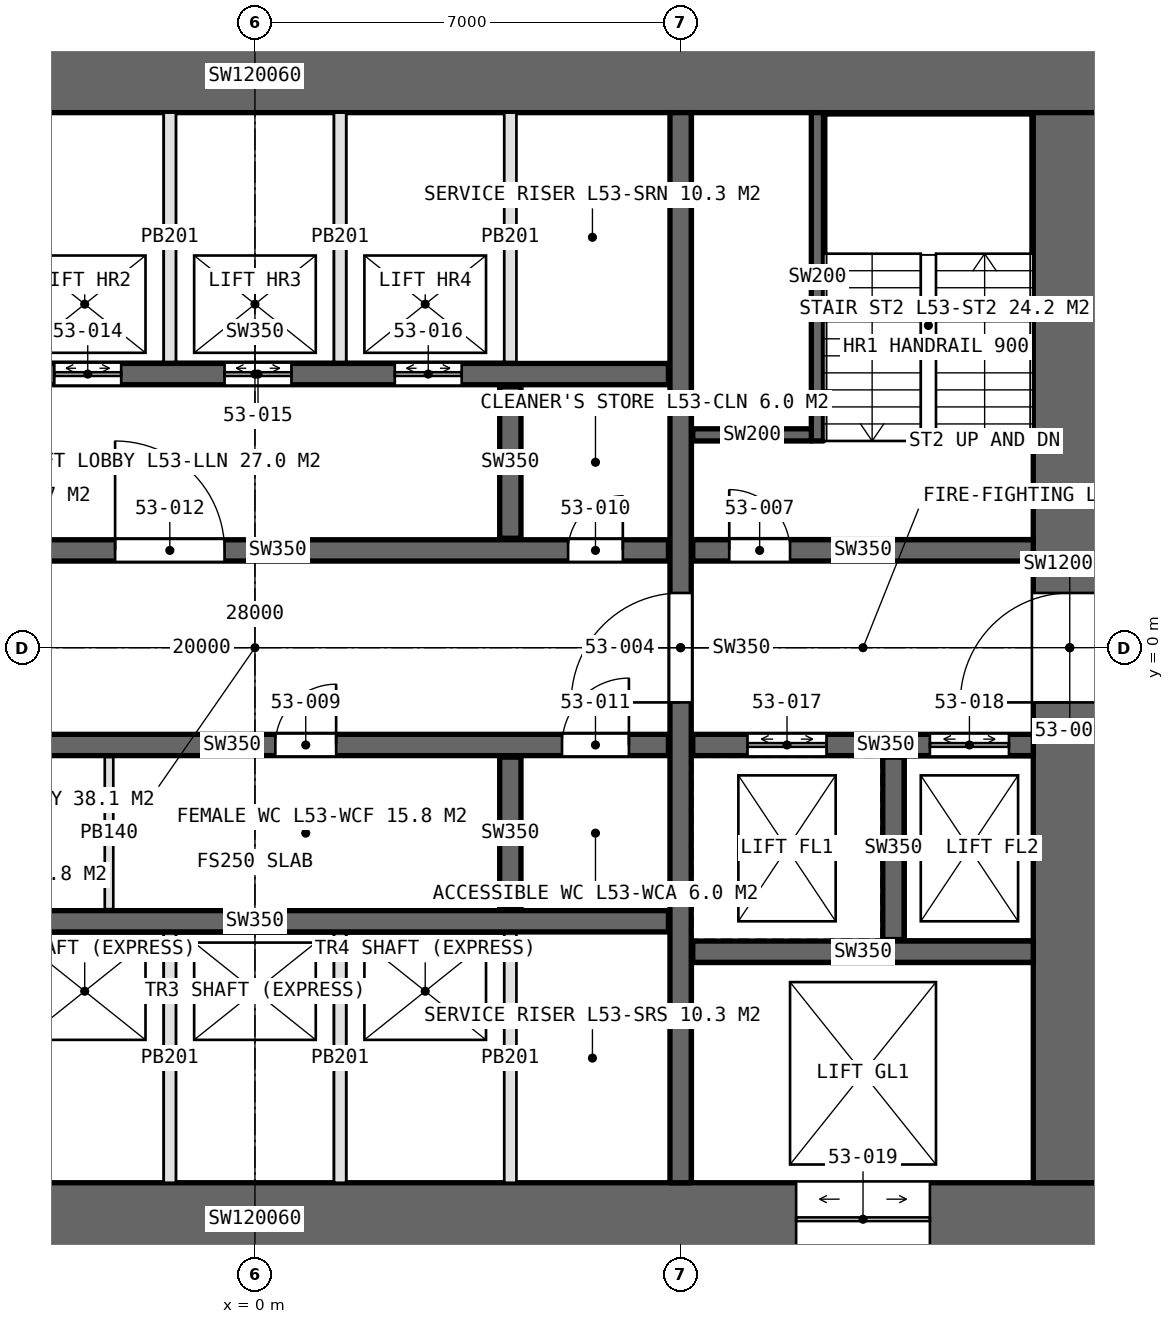
"""IFC4 building model, lengths in metres.
Left out: names, types, materials, properties, quantities, classifications, styles, units other than length and angle.
Written with IfcOpenShell. Run it as: python <this file> out.ifc"""

import sys

from ifc_helpers import new_model, si_unit, direction, frame, frame_2d, origin, place, context, subcontext, project, spatial, rectangle, extrude, element, fill, save


model = new_model("IFC4")
c1 = context("Model", 3, precision=1e-05, world=origin(), true_north=direction((0.0, 1.0)))
c2 = subcontext(c1, "Body", "Model", "MODEL_VIEW")
j1 = project(units=[si_unit("LENGTHUNIT", "METRE"), si_unit("PLANEANGLEUNIT", "RADIAN")], contexts=[c1])
p1 = place(None, origin())
s1 = spatial("IfcSite", under=j1, at=p1, CompositionType="ELEMENT")
p2 = place(p1, origin())
s2 = spatial("IfcBuilding", under=s1, at=p2, CompositionType="ELEMENT")
p3 = place(p2, frame((0.0, 0.0, 241.0)))
s3 = spatial("IfcBuildingStorey", under=s2, at=p3, CompositionType="ELEMENT", Elevation=241.0)
p4 = place(p3, frame((-14.0, -9.4, 0.0), z_axis=(0.0, 0.0, 1.0), x_axis=(1.0, 0.0, 0.0)))
e1 = element("IfcWall", 1, at=p4, inside=s3, PredefinedType="SHEAR", context=c2, shape_type="SweptSolid", body=[
    extrude(rectangle(XDim=28.0, YDim=1.2, at=frame_2d((14.0, 0.0))), origin(), (0.0, 0.0, 1.0), 4.2),
])
p5 = place(p4, frame((22.9, 0.0, 0.0)))
e2 = element("IfcOpeningElement", 2, at=p5, cuts=e1, PredefinedType="OPENING", context=c2, shape_type="SweptSolid", body=[
    extrude(rectangle(XDim=2.2, YDim=2.7, at=frame_2d((1.1, 1.35))), frame((0.0, 0.61, 0.0), z_axis=(0.0, -1.0, 0.0), x_axis=(1.0, 0.0, 0.0)), (0.0, 0.0, 1.0), 1.22),
])
p6 = place(p3, frame((14.0, 9.4, 0.0), z_axis=(0.0, 0.0, 1.0), x_axis=(-1.0, 0.0, 0.0)))
e3 = element("IfcWall", 3, at=p6, inside=s3, PredefinedType="SHEAR", context=c2, shape_type="SweptSolid", body=[
    extrude(rectangle(XDim=28.0, YDim=1.2, at=frame_2d((14.0, 0.0))), origin(), (0.0, 0.0, 1.0), 4.2),
])
p7 = place(p6, frame((24.0, 0.0, 0.0)))
e4 = element("IfcOpeningElement", 4, at=p7, cuts=e3, PredefinedType="OPENING", context=c2, shape_type="SweptSolid", body=[
    extrude(rectangle(XDim=1.0, YDim=2.4, at=frame_2d((0.5, 1.2))), frame((0.0, 0.61, 0.0), z_axis=(0.0, -1.0, 0.0), x_axis=(1.0, 0.0, 0.0)), (0.0, 0.0, 1.0), 1.22),
])
p8 = place(p3, frame((13.4, -8.8, 0.0), z_axis=(0.0, 0.0, 1.0), x_axis=(0.0, 1.0, 0.0)))
e5 = element("IfcWall", 5, at=p8, inside=s3, PredefinedType="SHEAR", context=c2, shape_type="SweptSolid", body=[
    extrude(rectangle(XDim=17.6, YDim=1.2, at=frame_2d((8.8, 0.0))), origin(), (0.0, 0.0, 1.0), 4.2),
])
p9 = place(p8, frame((7.9, 0.0, 0.0)))
e6 = element("IfcOpeningElement", 6, at=p9, cuts=e5, PredefinedType="OPENING", context=c2, shape_type="SweptSolid", body=[
    extrude(rectangle(XDim=1.8, YDim=2.4, at=frame_2d((0.9, 1.2))), frame((0.0, 0.61, 0.0), z_axis=(0.0, -1.0, 0.0), x_axis=(1.0, 0.0, 0.0)), (0.0, 0.0, 1.0), 1.22),
])
p10 = place(p3, frame((7.0, -8.8, 0.0), z_axis=(0.0, 0.0, 1.0), x_axis=(0.0, 1.0, 0.0)))
e7 = element("IfcWall", 7, at=p10, inside=s3, PredefinedType="SHEAR", context=c2, shape_type="SweptSolid", body=[
    extrude(rectangle(XDim=17.6, YDim=0.35, at=frame_2d((8.8, 0.0))), origin(), (0.0, 0.0, 1.0), 4.2),
])
p11 = place(p10, frame((7.9, 0.0, 0.0)))
e8 = element("IfcOpeningElement", 8, at=p11, cuts=e7, PredefinedType="OPENING", context=c2, shape_type="SweptSolid", body=[
    extrude(rectangle(XDim=1.8, YDim=2.4, at=frame_2d((0.9, 1.2))), frame((0.0, 0.185, 0.0), z_axis=(0.0, -1.0, 0.0), x_axis=(1.0, 0.0, 0.0)), (0.0, 0.0, 1.0), 0.37),
])
p12 = place(p3, frame((-6.8, 1.6, 0.0), z_axis=(0.0, 0.0, 1.0), x_axis=(1.0, 0.0, 0.0)))
e9 = element("IfcWall", 9, at=p12, inside=s3, PredefinedType="SHEAR", context=c2, shape_type="SweptSolid", body=[
    extrude(rectangle(XDim=13.6, YDim=0.35, at=frame_2d((6.8, 0.0))), origin(), (0.0, 0.0, 1.0), 4.2),
])
p13 = place(p12, frame((11.95, 0.0, 0.0)))
e10 = element("IfcOpeningElement", 10, at=p13, cuts=e9, PredefinedType="OPENING", context=c2, shape_type="SweptSolid", body=[
    extrude(rectangle(XDim=0.9, YDim=2.4, at=frame_2d((0.45, 1.2))), frame((0.0, 0.185, 0.0), z_axis=(0.0, -1.0, 0.0), x_axis=(1.0, 0.0, 0.0)), (0.0, 0.0, 1.0), 0.37),
])
p14 = place(p12, frame((4.5, 0.0, 0.0)))
e11 = element("IfcOpeningElement", 11, at=p14, cuts=e9, PredefinedType="OPENING", context=c2, shape_type="SweptSolid", body=[
    extrude(rectangle(XDim=1.8, YDim=2.4, at=frame_2d((0.9, 1.2))), frame((0.0, 0.185, 0.0), z_axis=(0.0, -1.0, 0.0), x_axis=(1.0, 0.0, 0.0)), (0.0, 0.0, 1.0), 0.37),
])
p15 = place(p3, frame((-6.8, -1.6, 0.0), z_axis=(0.0, 0.0, 1.0), x_axis=(1.0, 0.0, 0.0)))
e12 = element("IfcWall", 12, at=p15, inside=s3, PredefinedType="SHEAR", context=c2, shape_type="SweptSolid", body=[
    extrude(rectangle(XDim=13.6, YDim=0.35, at=frame_2d((6.8, 0.0))), origin(), (0.0, 0.0, 1.0), 4.2),
])
p16 = place(p15, frame((1.665, 0.0, 0.0)))
e13 = element("IfcOpeningElement", 13, at=p16, cuts=e12, PredefinedType="OPENING", context=c2, shape_type="SweptSolid", body=[
    extrude(rectangle(XDim=1.0, YDim=2.4, at=frame_2d((0.5, 1.2))), frame((0.0, 0.185, 0.0), z_axis=(0.0, -1.0, 0.0), x_axis=(1.0, 0.0, 0.0)), (0.0, 0.0, 1.0), 0.37),
])
p17 = place(p15, frame((7.135, 0.0, 0.0)))
e14 = element("IfcOpeningElement", 14, at=p17, cuts=e12, PredefinedType="OPENING", context=c2, shape_type="SweptSolid", body=[
    extrude(rectangle(XDim=1.0, YDim=2.4, at=frame_2d((0.5, 1.2))), frame((0.0, 0.185, 0.0), z_axis=(0.0, -1.0, 0.0), x_axis=(1.0, 0.0, 0.0)), (0.0, 0.0, 1.0), 0.37),
])
p18 = place(p15, frame((11.85, 0.0, 0.0)))
e15 = element("IfcOpeningElement", 15, at=p18, cuts=e12, PredefinedType="OPENING", context=c2, shape_type="SweptSolid", body=[
    extrude(rectangle(XDim=1.1, YDim=2.4, at=frame_2d((0.55, 1.2))), frame((0.0, 0.185, 0.0), z_axis=(0.0, -1.0, 0.0), x_axis=(1.0, 0.0, 0.0)), (0.0, 0.0, 1.0), 0.37),
])
p19 = place(p3, frame((-6.8, 4.5, 0.0), z_axis=(0.0, 0.0, 1.0), x_axis=(1.0, 0.0, 0.0)))
e16 = element("IfcWall", 16, at=p19, inside=s3, PredefinedType="SHEAR", context=c2, shape_type="SweptSolid", body=[
    extrude(rectangle(XDim=13.6, YDim=0.35, at=frame_2d((6.8, 0.0))), origin(), (0.0, 0.0, 1.0), 4.2),
])
p20 = place(p19, frame((0.7, 0.0, 0.0)))
e17 = element("IfcOpeningElement", 17, at=p20, cuts=e16, PredefinedType="OPENING", context=c2, shape_type="SweptSolid", body=[
    extrude(rectangle(XDim=1.1, YDim=2.4, at=frame_2d((0.55, 1.2))), frame((0.0, 0.185, 0.0), z_axis=(0.0, -1.0, 0.0), x_axis=(1.0, 0.0, 0.0)), (0.0, 0.0, 1.0), 0.37),
])
p21 = place(p19, frame((3.5, 0.0, 0.0)))
e18 = element("IfcOpeningElement", 18, at=p21, cuts=e16, PredefinedType="OPENING", context=c2, shape_type="SweptSolid", body=[
    extrude(rectangle(XDim=1.1, YDim=2.4, at=frame_2d((0.55, 1.2))), frame((0.0, 0.185, 0.0), z_axis=(0.0, -1.0, 0.0), x_axis=(1.0, 0.0, 0.0)), (0.0, 0.0, 1.0), 0.37),
])
p22 = place(p19, frame((6.3, 0.0, 0.0)))
e19 = element("IfcOpeningElement", 19, at=p22, cuts=e16, PredefinedType="OPENING", context=c2, shape_type="SweptSolid", body=[
    extrude(rectangle(XDim=1.1, YDim=2.4, at=frame_2d((0.55, 1.2))), frame((0.0, 0.185, 0.0), z_axis=(0.0, -1.0, 0.0), x_axis=(1.0, 0.0, 0.0)), (0.0, 0.0, 1.0), 0.37),
])
p23 = place(p19, frame((9.1, 0.0, 0.0)))
e20 = element("IfcOpeningElement", 20, at=p23, cuts=e16, PredefinedType="OPENING", context=c2, shape_type="SweptSolid", body=[
    extrude(rectangle(XDim=1.1, YDim=2.4, at=frame_2d((0.55, 1.2))), frame((0.0, 0.185, 0.0), z_axis=(0.0, -1.0, 0.0), x_axis=(1.0, 0.0, 0.0)), (0.0, 0.0, 1.0), 0.37),
])
p24 = place(p3, frame((-6.8, -4.5, 0.0), z_axis=(0.0, 0.0, 1.0), x_axis=(1.0, 0.0, 0.0)))
e21 = element("IfcWall", 21, at=p24, inside=s3, PredefinedType="SHEAR", context=c2, shape_type="SweptSolid", body=[
    extrude(rectangle(XDim=13.6, YDim=0.35, at=frame_2d((6.8, 0.0))), origin(), (0.0, 0.0, 1.0), 4.2),
])
p25 = place(p3, frame((7.2, 1.6, 0.0), z_axis=(0.0, 0.0, 1.0), x_axis=(1.0, 0.0, 0.0)))
e22 = element("IfcWall", 22, at=p25, inside=s3, PredefinedType="SHEAR", context=c2, shape_type="SweptSolid", body=[
    extrude(rectangle(XDim=5.6, YDim=0.35, at=frame_2d((2.8, 0.0))), origin(), (0.0, 0.0, 1.0), 4.2),
])
p26 = place(p25, frame((0.6, 0.0, 0.0)))
e23 = element("IfcOpeningElement", 23, at=p26, cuts=e22, PredefinedType="OPENING", context=c2, shape_type="SweptSolid", body=[
    extrude(rectangle(XDim=1.0, YDim=2.4, at=frame_2d((0.5, 1.2))), frame((0.0, 0.185, 0.0), z_axis=(0.0, -1.0, 0.0), x_axis=(1.0, 0.0, 0.0)), (0.0, 0.0, 1.0), 0.37),
])
p27 = place(p3, frame((7.2, -1.6, 0.0), z_axis=(0.0, 0.0, 1.0), x_axis=(1.0, 0.0, 0.0)))
e24 = element("IfcWall", 24, at=p27, inside=s3, PredefinedType="SHEAR", context=c2, shape_type="SweptSolid", body=[
    extrude(rectangle(XDim=5.6, YDim=0.35, at=frame_2d((2.8, 0.0))), origin(), (0.0, 0.0, 1.0), 4.2),
])
p28 = place(p27, frame((0.9, 0.0, 0.0)))
e25 = element("IfcOpeningElement", 25, at=p28, cuts=e24, PredefinedType="OPENING", context=c2, shape_type="SweptSolid", body=[
    extrude(rectangle(XDim=1.3, YDim=2.4, at=frame_2d((0.65, 1.2))), frame((0.0, 0.185, 0.0), z_axis=(0.0, -1.0, 0.0), x_axis=(1.0, 0.0, 0.0)), (0.0, 0.0, 1.0), 0.37),
])
p29 = place(p27, frame((3.9, 0.0, 0.0)))
e26 = element("IfcOpeningElement", 26, at=p29, cuts=e24, PredefinedType="OPENING", context=c2, shape_type="SweptSolid", body=[
    extrude(rectangle(XDim=1.3, YDim=2.4, at=frame_2d((0.65, 1.2))), frame((0.0, 0.185, 0.0), z_axis=(0.0, -1.0, 0.0), x_axis=(1.0, 0.0, 0.0)), (0.0, 0.0, 1.0), 0.37),
])
p30 = place(p3, frame((10.5, -4.8, 0.0), z_axis=(0.0, 0.0, 1.0), x_axis=(0.0, 1.0, 0.0)))
e27 = element("IfcWall", 27, at=p30, inside=s3, PredefinedType="SHEAR", context=c2, shape_type="SweptSolid", body=[
    extrude(rectangle(XDim=3.0, YDim=0.35, at=frame_2d((1.5, 0.0))), origin(), (0.0, 0.0, 1.0), 4.2),
])
p31 = place(p3, frame((7.2, -5.0, 0.0), z_axis=(0.0, 0.0, 1.0), x_axis=(1.0, 0.0, 0.0)))
e28 = element("IfcWall", 28, at=p31, inside=s3, PredefinedType="SHEAR", context=c2, shape_type="SweptSolid", body=[
    extrude(rectangle(XDim=5.6, YDim=0.35, at=frame_2d((2.8, 0.0))), origin(), (0.0, 0.0, 1.0), 4.2),
])
for number, where, z_axis, x_axis in (
    (29, (4.2, 1.8, 0.0), (0.0, 0.0, 1.0), (0.0, 1.0, 0.0)),
    (30, (4.2, -4.3, 0.0), (0.0, 0.0, 1.0), (0.0, 1.0, 0.0)),
):
    element("IfcWall", number, at=place(p3, frame(where, z_axis=z_axis, x_axis=x_axis)), inside=s3, PredefinedType="SHEAR", context=c2, shape_type="SweptSolid", body=[
        extrude(rectangle(XDim=2.5, YDim=0.35, at=frame_2d((1.25, 0.0))), origin(), (0.0, 0.0, 1.0), 4.2),
    ])
p32 = place(p3, frame((-2.4, -1.8, 0.0), z_axis=(0.0, 0.0, 1.0), x_axis=(0.0, -1.0, 0.0)))
e31 = element("IfcWall", 31, at=p32, inside=s3, PredefinedType="PARTITIONING", context=c2, shape_type="SweptSolid", body=[
    extrude(rectangle(XDim=2.5, YDim=0.14, at=frame_2d((1.25, 0.0))), origin(), (0.0, 0.0, 1.0), 3.95),
])
for number, where, z_axis, x_axis in (
    (32, (-1.4, 4.7, 0.0), (0.0, 0.0, 1.0), (0.0, 1.0, 0.0)),
    (33, (1.4, 4.7, 0.0), (0.0, 0.0, 1.0), (0.0, 1.0, 0.0)),
    (34, (4.2, 4.7, 0.0), (0.0, 0.0, 1.0), (0.0, 1.0, 0.0)),
    (35, (-1.4, -4.7, 0.0), (0.0, 0.0, 1.0), (0.0, -1.0, 0.0)),
    (36, (1.4, -4.7, 0.0), (0.0, 0.0, 1.0), (0.0, -1.0, 0.0)),
    (37, (4.2, -4.7, 0.0), (0.0, 0.0, 1.0), (0.0, -1.0, 0.0)),
):
    element("IfcWall", number, at=place(p3, frame(where, z_axis=z_axis, x_axis=x_axis)), inside=s3, PredefinedType="PARTITIONING", context=c2, shape_type="SweptSolid", body=[
        extrude(rectangle(XDim=4.1, YDim=0.2, at=frame_2d((2.05, 0.0))), origin(), (0.0, 0.0, 1.0), 4.2),
    ])
p33 = place(p3, frame((9.25, 3.4, 0.0), z_axis=(0.0, 0.0, 1.0), x_axis=(0.0, 1.0, 0.0)))
e38 = element("IfcWall", 38, at=p33, inside=s3, PredefinedType="SOLIDWALL", context=c2, shape_type="SweptSolid", body=[
    extrude(rectangle(XDim=5.4, YDim=0.2, at=frame_2d((2.7, 0.0))), origin(), (0.0, 0.0, 1.0), 4.2),
])
p34 = place(p3, frame((9.15, 3.5, 0.0), z_axis=(0.0, 0.0, 1.0), x_axis=(-1.0, 0.0, 0.0)))
e39 = element("IfcWall", 39, at=p34, inside=s3, PredefinedType="SOLIDWALL", context=c2, shape_type="SweptSolid", body=[
    extrude(rectangle(XDim=1.95, YDim=0.2, at=frame_2d((0.975, 0.0))), origin(), (0.0, 0.0, 1.0), 4.2),
])
p35 = place(p9, origin())
e40 = element("IfcDoor", 40, at=p35, inside=s3, OperationType="DOUBLE_DOOR_SINGLE_SWING", PredefinedType="DOOR", context=c2, shape_type="SweptSolid", body=[
    extrude(rectangle(XDim=1.8, YDim=2.4, at=frame_2d((0.9, 1.2))), frame((0.0, 0.025, 0.0), z_axis=(0.0, -1.0, 0.0), x_axis=(1.0, 0.0, 0.0)), (0.0, 0.0, 1.0), 0.05),
])
fill(e6, e40)
p36 = place(p11, origin())
e41 = element("IfcDoor", 41, at=p36, inside=s3, OperationType="DOUBLE_DOOR_SINGLE_SWING", PredefinedType="DOOR", context=c2, shape_type="SweptSolid", body=[
    extrude(rectangle(XDim=1.8, YDim=2.4, at=frame_2d((0.9, 1.2))), frame((0.0, 0.025, 0.0), z_axis=(0.0, -1.0, 0.0), x_axis=(1.0, 0.0, 0.0)), (0.0, 0.0, 1.0), 0.05),
])
fill(e8, e41)
p37 = place(p26, origin())
e42 = element("IfcDoor", 42, at=p37, inside=s3, OperationType="SINGLE_SWING_LEFT", PredefinedType="DOOR", context=c2, shape_type="SweptSolid", body=[
    extrude(rectangle(XDim=1.0, YDim=2.4, at=frame_2d((0.5, 1.2))), frame((0.0, 0.025, 0.0), z_axis=(0.0, -1.0, 0.0), x_axis=(1.0, 0.0, 0.0)), (0.0, 0.0, 1.0), 0.05),
])
fill(e23, e42)
p38 = place(p17, origin())
e43 = element("IfcDoor", 43, at=p38, inside=s3, OperationType="SINGLE_SWING_RIGHT", PredefinedType="DOOR", context=c2, shape_type="SweptSolid", body=[
    extrude(rectangle(XDim=1.0, YDim=2.4, at=frame_2d((0.5, 1.2))), frame((0.0, 0.025, 0.0), z_axis=(0.0, -1.0, 0.0), x_axis=(1.0, 0.0, 0.0)), (0.0, 0.0, 1.0), 0.05),
])
fill(e14, e43)
p39 = place(p13, origin())
e44 = element("IfcDoor", 44, at=p39, inside=s3, OperationType="SINGLE_SWING_RIGHT", PredefinedType="DOOR", context=c2, shape_type="SweptSolid", body=[
    extrude(rectangle(XDim=0.9, YDim=2.4, at=frame_2d((0.45, 1.2))), frame((0.0, 0.025, 0.0), z_axis=(0.0, -1.0, 0.0), x_axis=(1.0, 0.0, 0.0)), (0.0, 0.0, 1.0), 0.05),
])
fill(e10, e44)
p40 = place(p18, origin())
e45 = element("IfcDoor", 45, at=p40, inside=s3, OperationType="SINGLE_SWING_RIGHT", PredefinedType="DOOR", context=c2, shape_type="SweptSolid", body=[
    extrude(rectangle(XDim=1.1, YDim=2.4, at=frame_2d((0.55, 1.2))), frame((0.0, 0.025, 0.0), z_axis=(0.0, -1.0, 0.0), x_axis=(1.0, 0.0, 0.0)), (0.0, 0.0, 1.0), 0.05),
])
fill(e15, e45)
p41 = place(p14, origin())
e46 = element("IfcDoor", 46, at=p41, inside=s3, OperationType="DOUBLE_DOOR_SINGLE_SWING", PredefinedType="DOOR", context=c2, shape_type="SweptSolid", body=[
    extrude(rectangle(XDim=1.8, YDim=2.4, at=frame_2d((0.9, 1.2))), frame((0.0, 0.025, 0.0), z_axis=(0.0, -1.0, 0.0), x_axis=(1.0, 0.0, 0.0)), (0.0, 0.0, 1.0), 0.05),
])
fill(e11, e46)
p42 = place(p21, origin())
e47 = element("IfcDoor", 47, at=p42, inside=s3, OperationType="DOUBLE_DOOR_SLIDING", PredefinedType="DOOR", context=c2, shape_type="SweptSolid", body=[
    extrude(rectangle(XDim=1.1, YDim=2.4, at=frame_2d((0.55, 1.2))), frame((0.0, 0.025, 0.0), z_axis=(0.0, -1.0, 0.0), x_axis=(1.0, 0.0, 0.0)), (0.0, 0.0, 1.0), 0.05),
])
fill(e18, e47)
p43 = place(p22, origin())
e48 = element("IfcDoor", 48, at=p43, inside=s3, OperationType="DOUBLE_DOOR_SLIDING", PredefinedType="DOOR", context=c2, shape_type="SweptSolid", body=[
    extrude(rectangle(XDim=1.1, YDim=2.4, at=frame_2d((0.55, 1.2))), frame((0.0, 0.025, 0.0), z_axis=(0.0, -1.0, 0.0), x_axis=(1.0, 0.0, 0.0)), (0.0, 0.0, 1.0), 0.05),
])
fill(e19, e48)
p44 = place(p23, origin())
e49 = element("IfcDoor", 49, at=p44, inside=s3, OperationType="DOUBLE_DOOR_SLIDING", PredefinedType="DOOR", context=c2, shape_type="SweptSolid", body=[
    extrude(rectangle(XDim=1.1, YDim=2.4, at=frame_2d((0.55, 1.2))), frame((0.0, 0.025, 0.0), z_axis=(0.0, -1.0, 0.0), x_axis=(1.0, 0.0, 0.0)), (0.0, 0.0, 1.0), 0.05),
])
fill(e20, e49)
p45 = place(p28, origin())
e50 = element("IfcDoor", 50, at=p45, inside=s3, OperationType="DOUBLE_DOOR_SLIDING", PredefinedType="DOOR", context=c2, shape_type="SweptSolid", body=[
    extrude(rectangle(XDim=1.3, YDim=2.4, at=frame_2d((0.65, 1.2))), frame((0.0, 0.025, 0.0), z_axis=(0.0, -1.0, 0.0), x_axis=(1.0, 0.0, 0.0)), (0.0, 0.0, 1.0), 0.05),
])
fill(e25, e50)
p46 = place(p29, origin())
e51 = element("IfcDoor", 51, at=p46, inside=s3, OperationType="DOUBLE_DOOR_SLIDING", PredefinedType="DOOR", context=c2, shape_type="SweptSolid", body=[
    extrude(rectangle(XDim=1.3, YDim=2.4, at=frame_2d((0.65, 1.2))), frame((0.0, 0.025, 0.0), z_axis=(0.0, -1.0, 0.0), x_axis=(1.0, 0.0, 0.0)), (0.0, 0.0, 1.0), 0.05),
])
fill(e26, e51)
p47 = place(p5, origin())
e52 = element("IfcDoor", 52, at=p47, inside=s3, OperationType="DOUBLE_DOOR_SLIDING", PredefinedType="DOOR", context=c2, shape_type="SweptSolid", body=[
    extrude(rectangle(XDim=2.2, YDim=2.7, at=frame_2d((1.1, 1.35))), frame((0.0, 0.025, 0.0), z_axis=(0.0, -1.0, 0.0), x_axis=(1.0, 0.0, 0.0)), (0.0, 0.0, 1.0), 0.05),
])
fill(e2, e52)
save(model, sys.argv[1])
